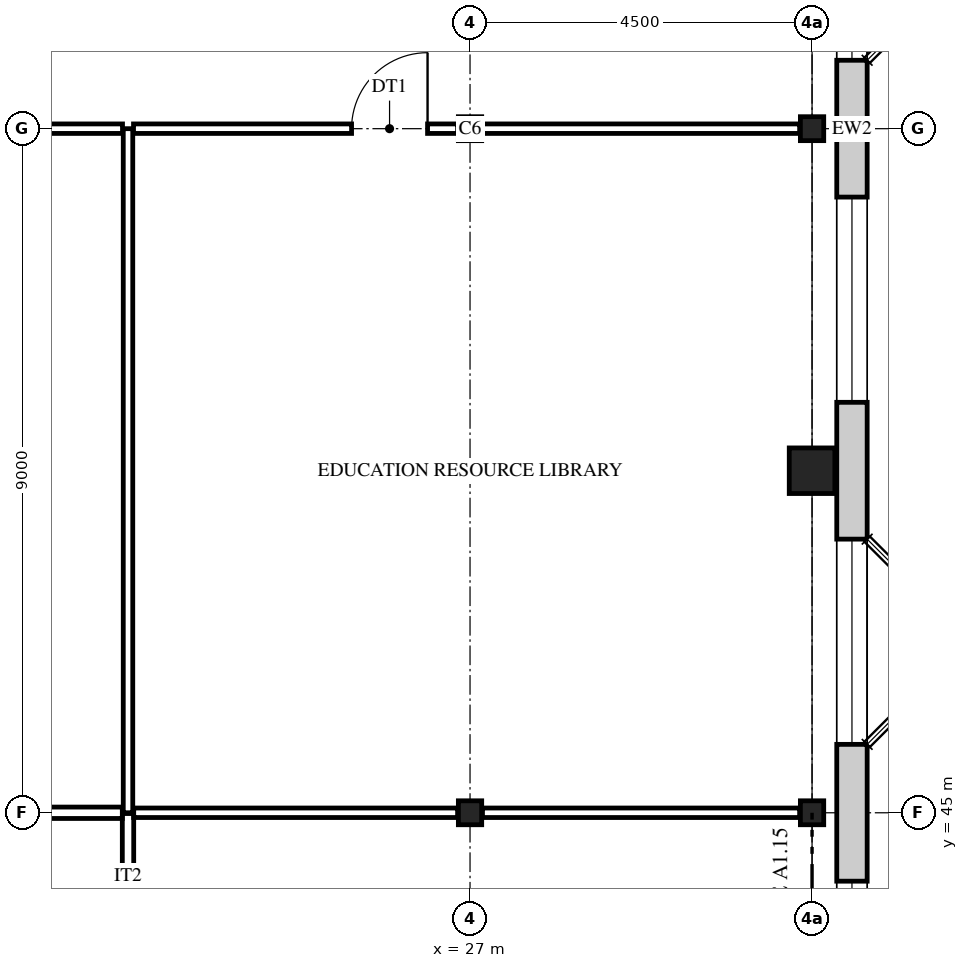
"""IFC4 building model, lengths in metres.
Left out: names, types, materials, properties, quantities, classifications, styles, units other than length and angle.
Written with IfcOpenShell. Run it as: python <this file> out.ifc"""

import sys

from ifc_helpers import new_model, si_unit, direction, frame, frame_2d, origin, origin_2d, place, context, subcontext, project, spatial, rectangle, i_section, extrude, element, fill, save


model = new_model("IFC4")
c1 = context("Model", 3, precision=1e-05, world=origin(), true_north=direction((0.0, 1.0)))
c2 = subcontext(c1, "Body", "Model", "MODEL_VIEW")
j1 = project(units=[si_unit("LENGTHUNIT", "METRE"), si_unit("PLANEANGLEUNIT", "RADIAN")], contexts=[c1])
p1 = place(None, origin())
s1 = spatial("IfcSite", under=j1, at=p1, CompositionType="ELEMENT")
p2 = place(p1, origin())
s2 = spatial("IfcBuilding", under=s1, at=p2, CompositionType="ELEMENT")
p3 = place(p2, frame((0.0, 0.0, 10.5)))
s3 = spatial("IfcBuildingStorey", under=s2, at=p3, CompositionType="ELEMENT", Elevation=10.5)
for number, where, z_axis, x_axis in (
    (1, (27.0, 45.0, 0.0), (0.0, 0.0, 1.0), (1.0, 0.0, 0.0)),
    (2, (27.0, 54.0, 0.0), (0.0, 0.0, 1.0), (1.0, 0.0, 0.0)),
    (3, (31.5, 45.0, 0.0), (0.0, 0.0, 1.0), (1.0, 0.0, 0.0)),
    (4, (31.5, 54.0, 0.0), (0.0, 0.0, 1.0), (1.0, 0.0, 0.0)),
):
    element("IfcColumn", number, at=place(p3, frame(where, z_axis=z_axis, x_axis=x_axis)), inside=s3, PredefinedType="COLUMN", context=c2, shape_type="SweptSolid", body=[
        extrude(i_section(OverallWidth=0.307, OverallDepth=0.315, WebThickness=0.012, FlangeThickness=0.019, FilletRadius=0.017, at=origin_2d()), origin(), (0.0, 0.0, 1.0), 4.5),
    ])
p4 = place(p3, frame((31.5, 49.5, 0.0), z_axis=(0.0, 0.0, 1.0), x_axis=(1.0, 0.0, 0.0)))
e5 = element("IfcColumn", 5, at=p4, inside=s3, PredefinedType="COLUMN", context=c2, shape_type="SweptSolid", body=[
    extrude(rectangle(XDim=0.6, YDim=0.6, at=origin_2d()), origin(), (0.0, 0.0, 1.0), 4.5),
])
p5 = place(p3, frame((32.025, 72.325, 0.0), z_axis=(0.0, 0.0, 1.0), x_axis=(0.0, -1.0, 0.0)))
e6 = element("IfcWall", 6, at=p5, inside=s3, PredefinedType="STANDARD", context=c2, shape_type="SweptSolid", body=[
    extrude(rectangle(XDim=36.65, YDim=0.4, at=frame_2d((18.325, 0.0))), origin(), (0.0, 0.0, 1.0), 4.5),
])
p6 = place(p5, frame((32.725, 0.0, 0.9)))
e7 = element("IfcOpeningElement", 7, at=p6, cuts=e6, PredefinedType="OPENING", context=c2, shape_type="SweptSolid", body=[
    extrude(rectangle(XDim=2.7, YDim=2.8, at=frame_2d((1.35, 1.4))), frame((0.0, 0.21, 0.0), z_axis=(0.0, -1.0, 0.0), x_axis=(1.0, 0.0, 0.0)), (0.0, 0.0, 1.0), 0.42),
])
p7 = place(p5, frame((28.225, 0.0, 0.9)))
e8 = element("IfcOpeningElement", 8, at=p7, cuts=e6, PredefinedType="OPENING", context=c2, shape_type="SweptSolid", body=[
    extrude(rectangle(XDim=2.7, YDim=2.8, at=frame_2d((1.35, 1.4))), frame((0.0, 0.21, 0.0), z_axis=(0.0, -1.0, 0.0), x_axis=(1.0, 0.0, 0.0)), (0.0, 0.0, 1.0), 0.42),
])
p8 = place(p5, frame((23.725, 0.0, 0.9)))
e9 = element("IfcOpeningElement", 9, at=p8, cuts=e6, PredefinedType="OPENING", context=c2, shape_type="SweptSolid", body=[
    extrude(rectangle(XDim=2.7, YDim=2.8, at=frame_2d((1.35, 1.4))), frame((0.0, 0.21, 0.0), z_axis=(0.0, -1.0, 0.0), x_axis=(1.0, 0.0, 0.0)), (0.0, 0.0, 1.0), 0.42),
])
p9 = place(p5, frame((19.225, 0.0, 0.9)))
e10 = element("IfcOpeningElement", 10, at=p9, cuts=e6, PredefinedType="OPENING", context=c2, shape_type="SweptSolid", body=[
    extrude(rectangle(XDim=2.7, YDim=2.8, at=frame_2d((1.35, 1.4))), frame((0.0, 0.21, 0.0), z_axis=(0.0, -1.0, 0.0), x_axis=(1.0, 0.0, 0.0)), (0.0, 0.0, 1.0), 0.42),
])
p10 = place(p5, frame((14.725, 0.0, 0.9)))
e11 = element("IfcOpeningElement", 11, at=p10, cuts=e6, PredefinedType="OPENING", context=c2, shape_type="SweptSolid", body=[
    extrude(rectangle(XDim=2.7, YDim=2.8, at=frame_2d((1.35, 1.4))), frame((0.0, 0.21, 0.0), z_axis=(0.0, -1.0, 0.0), x_axis=(1.0, 0.0, 0.0)), (0.0, 0.0, 1.0), 0.42),
])
p11 = place(p5, frame((10.225, 0.0, 0.9)))
e12 = element("IfcOpeningElement", 12, at=p11, cuts=e6, PredefinedType="OPENING", context=c2, shape_type="SweptSolid", body=[
    extrude(rectangle(XDim=2.7, YDim=2.8, at=frame_2d((1.35, 1.4))), frame((0.0, 0.21, 0.0), z_axis=(0.0, -1.0, 0.0), x_axis=(1.0, 0.0, 0.0)), (0.0, 0.0, 1.0), 0.42),
])
p12 = place(p5, frame((5.725, 0.0, 0.9)))
e13 = element("IfcOpeningElement", 13, at=p12, cuts=e6, PredefinedType="OPENING", context=c2, shape_type="SweptSolid", body=[
    extrude(rectangle(XDim=2.7, YDim=2.8, at=frame_2d((1.35, 1.4))), frame((0.0, 0.21, 0.0), z_axis=(0.0, -1.0, 0.0), x_axis=(1.0, 0.0, 0.0)), (0.0, 0.0, 1.0), 0.42),
])
p13 = place(p5, frame((1.225, 0.0, 0.9)))
e14 = element("IfcOpeningElement", 14, at=p13, cuts=e6, PredefinedType="OPENING", context=c2, shape_type="SweptSolid", body=[
    extrude(rectangle(XDim=2.7, YDim=2.8, at=frame_2d((1.35, 1.4))), frame((0.0, 0.21, 0.0), z_axis=(0.0, -1.0, 0.0), x_axis=(1.0, 0.0, 0.0)), (0.0, 0.0, 1.0), 0.42),
])
p14 = place(p3, frame((22.5, 40.585, 0.0), z_axis=(0.0, 0.0, 1.0), x_axis=(0.0, 1.0, 0.0)))
e15 = element("IfcWall", 15, at=p14, inside=s3, PredefinedType="PARTITIONING", context=c2, shape_type="SweptSolid", body=[
    extrude(rectangle(XDim=4.405, YDim=0.15, at=frame_2d((2.203, 0.0))), origin(), (0.0, 0.0, 1.0), 3.822),
])
p15 = place(p14, frame((1.603, 0.0, 0.0)))
e16 = element("IfcOpeningElement", 16, at=p15, cuts=e15, PredefinedType="OPENING", context=c2, shape_type="SweptSolid", body=[
    extrude(rectangle(XDim=1.0, YDim=2.1, at=frame_2d((0.5, 1.05))), frame((0.0, 0.085, 0.0), z_axis=(0.0, -1.0, 0.0), x_axis=(1.0, 0.0, 0.0)), (0.0, 0.0, 1.0), 0.17),
])
p16 = place(p3, frame((22.5, 45.0, 0.0), z_axis=(0.0, 0.0, 1.0), x_axis=(0.0, 1.0, 0.0)))
e17 = element("IfcWall", 17, at=p16, inside=s3, PredefinedType="PARTITIONING", context=c2, shape_type="SweptSolid", body=[
    extrude(rectangle(XDim=9.0, YDim=0.125, at=frame_2d((4.5, 0.0))), origin(), (0.0, 0.0, 1.0), 3.822),
])
p17 = place(p3, frame((18.164, 45.0, 0.0), z_axis=(0.0, 0.0, 1.0), x_axis=(1.0, 0.0, 0.0)))
e18 = element("IfcWall", 18, at=p17, inside=s3, PredefinedType="PARTITIONING", context=c2, shape_type="SweptSolid", body=[
    extrude(rectangle(XDim=4.261, YDim=0.15, at=frame_2d((2.131, 0.0))), origin(), (0.0, 0.0, 1.0), 3.822),
])
p18 = place(p3, frame((22.575, 45.0, 0.0), z_axis=(0.0, 0.0, 1.0), x_axis=(1.0, 0.0, 0.0)))
e19 = element("IfcWall", 19, at=p18, inside=s3, PredefinedType="PARTITIONING", context=c2, shape_type="SweptSolid", body=[
    extrude(rectangle(XDim=4.261, YDim=0.125, at=frame_2d((2.131, 0.0))), origin(), (0.0, 0.0, 1.0), 3.822),
])
p19 = place(p3, frame((27.164, 45.0, 0.0), z_axis=(0.0, 0.0, 1.0), x_axis=(1.0, 0.0, 0.0)))
e20 = element("IfcWall", 20, at=p19, inside=s3, PredefinedType="PARTITIONING", context=c2, shape_type="SweptSolid", body=[
    extrude(rectangle(XDim=4.173, YDim=0.125, at=frame_2d((2.086, 0.0))), origin(), (0.0, 0.0, 1.0), 3.822),
])
p20 = place(p3, frame((18.164, 54.0, 0.0), z_axis=(0.0, 0.0, 1.0), x_axis=(1.0, 0.0, 0.0)))
e21 = element("IfcWall", 21, at=p20, inside=s3, PredefinedType="PARTITIONING", context=c2, shape_type="SweptSolid", body=[
    extrude(rectangle(XDim=4.264, YDim=0.125, at=frame_2d((2.132, 0.0))), origin(), (0.0, 0.0, 1.0), 3.822),
])
p21 = place(p3, frame((22.573, 54.0, 0.0), z_axis=(0.0, 0.0, 1.0), x_axis=(1.0, 0.0, 0.0)))
e22 = element("IfcWall", 22, at=p21, inside=s3, PredefinedType="PARTITIONING", context=c2, shape_type="SweptSolid", body=[
    extrude(rectangle(XDim=4.264, YDim=0.125, at=frame_2d((2.132, 0.0))), origin(), (0.0, 0.0, 1.0), 3.822),
])
p22 = place(p21, frame((2.869, 0.0, 0.0)))
e23 = element("IfcOpeningElement", 23, at=p22, cuts=e22, PredefinedType="OPENING", context=c2, shape_type="SweptSolid", body=[
    extrude(rectangle(XDim=1.0, YDim=2.1, at=frame_2d((0.5, 1.05))), frame((0.0, 0.073, 0.0), z_axis=(0.0, -1.0, 0.0), x_axis=(1.0, 0.0, 0.0)), (0.0, 0.0, 1.0), 0.145),
])
p23 = place(p3, frame((27.164, 54.0, 0.0), z_axis=(0.0, 0.0, 1.0), x_axis=(1.0, 0.0, 0.0)))
e24 = element("IfcWall", 24, at=p23, inside=s3, PredefinedType="PARTITIONING", context=c2, shape_type="SweptSolid", body=[
    extrude(rectangle(XDim=4.173, YDim=0.125, at=frame_2d((2.086, 0.0))), origin(), (0.0, 0.0, 1.0), 3.822),
])
p24 = place(p7, origin())
e25 = element("IfcWindow", 25, at=p24, inside=s3, PartitioningType="SINGLE_PANEL", PredefinedType="WINDOW", context=c2, shape_type="SweptSolid", body=[
    extrude(rectangle(XDim=2.7, YDim=2.8, at=frame_2d((1.35, 1.4))), frame((0.0, 0.03, 0.0), z_axis=(0.0, -1.0, 0.0), x_axis=(1.0, 0.0, 0.0)), (0.0, 0.0, 1.0), 0.06),
])
fill(e8, e25)
p25 = place(p8, origin())
e26 = element("IfcWindow", 26, at=p25, inside=s3, PartitioningType="SINGLE_PANEL", PredefinedType="WINDOW", context=c2, shape_type="SweptSolid", body=[
    extrude(rectangle(XDim=2.7, YDim=2.8, at=frame_2d((1.35, 1.4))), frame((0.0, 0.03, 0.0), z_axis=(0.0, -1.0, 0.0), x_axis=(1.0, 0.0, 0.0)), (0.0, 0.0, 1.0), 0.06),
])
fill(e9, e26)
p26 = place(p9, origin())
e27 = element("IfcWindow", 27, at=p26, inside=s3, PartitioningType="SINGLE_PANEL", PredefinedType="WINDOW", context=c2, shape_type="SweptSolid", body=[
    extrude(rectangle(XDim=2.7, YDim=2.8, at=frame_2d((1.35, 1.4))), frame((0.0, 0.03, 0.0), z_axis=(0.0, -1.0, 0.0), x_axis=(1.0, 0.0, 0.0)), (0.0, 0.0, 1.0), 0.06),
])
fill(e10, e27)
p27 = place(p10, origin())
e28 = element("IfcWindow", 28, at=p27, inside=s3, PartitioningType="SINGLE_PANEL", PredefinedType="WINDOW", context=c2, shape_type="SweptSolid", body=[
    extrude(rectangle(XDim=2.7, YDim=2.8, at=frame_2d((1.35, 1.4))), frame((0.0, 0.03, 0.0), z_axis=(0.0, -1.0, 0.0), x_axis=(1.0, 0.0, 0.0)), (0.0, 0.0, 1.0), 0.06),
])
fill(e11, e28)
p28 = place(p22, frame((1.0, 0.0, 0.0), z_axis=(0.0, 0.0, 1.0), x_axis=(-1.0, 0.0, 0.0)))
e29 = element("IfcDoor", 29, at=p28, inside=s3, OperationType="SINGLE_SWING_RIGHT", PredefinedType="DOOR", context=c2, shape_type="SweptSolid", body=[
    extrude(rectangle(XDim=1.0, YDim=2.1, at=frame_2d((0.5, 1.05))), frame((0.0, 0.025, 0.0), z_axis=(0.0, -1.0, 0.0), x_axis=(1.0, 0.0, 0.0)), (0.0, 0.0, 1.0), 0.05),
])
fill(e23, e29)
save(model, sys.argv[1])
